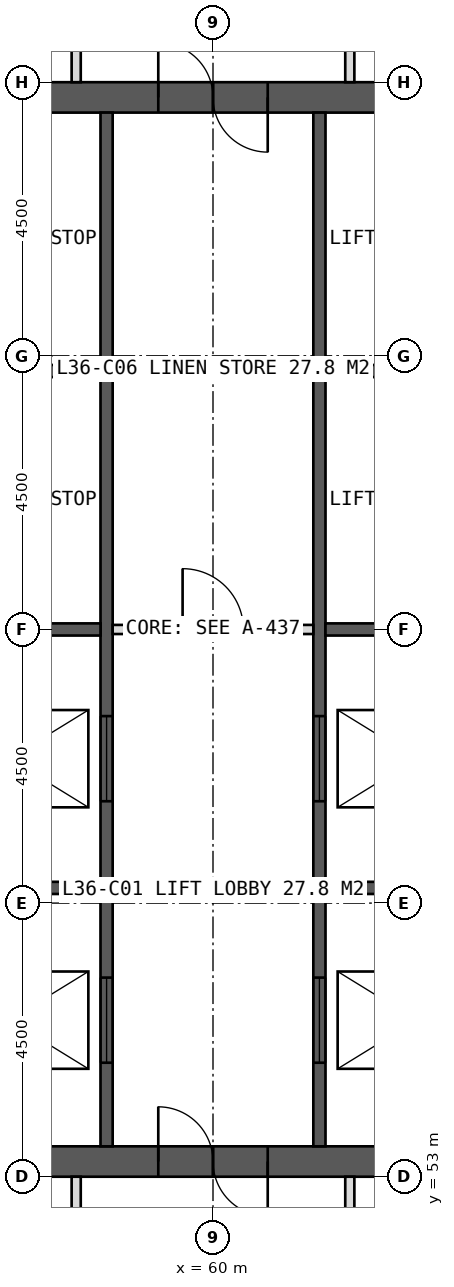
"""IFC4 building model, lengths in metres.
Left out: names, types, materials, properties, quantities, classifications, styles, units other than length and angle.
Written with IfcOpenShell. Run it as: python <this file> out.ifc"""

import sys

from ifc_helpers import new_model, si_unit, direction, frame, frame_2d, origin, place, context, subcontext, project, spatial, rectangle, extrude, element, fill, save


model = new_model("IFC4")
c1 = context("Model", 3, precision=1e-05, world=origin(), true_north=direction((0.0, 1.0)))
c2 = subcontext(c1, "Body", "Model", "MODEL_VIEW")
j1 = project(units=[si_unit("LENGTHUNIT", "METRE"), si_unit("PLANEANGLEUNIT", "RADIAN")], contexts=[c1])
p1 = place(None, origin())
s1 = spatial("IfcSite", under=j1, at=p1, CompositionType="ELEMENT")
p2 = place(p1, origin())
s2 = spatial("IfcBuilding", under=s1, at=p2, CompositionType="ELEMENT")
p3 = place(p2, frame((0.0, 0.0, 152.0)))
s3 = spatial("IfcBuildingStorey", under=s2, at=p3, CompositionType="ELEMENT", Elevation=152.0)
p4 = place(p3, frame((51.0, 70.75, 0.0), z_axis=(0.0, 0.0, 1.0), x_axis=(1.0, 0.0, 0.0)))
e1 = element("IfcWall", 1, at=p4, inside=s3, PredefinedType="SHEAR", context=c2, shape_type="SweptSolid", body=[
    extrude(rectangle(XDim=18.0, YDim=0.5, at=frame_2d((9.0, 0.0))), origin(), (0.0, 0.0, 1.0), 4.0),
])
p5 = place(p4, frame((8.1, 0.0, 0.0)))
e2 = element("IfcOpeningElement", 2, at=p5, cuts=e1, PredefinedType="OPENING", context=c2, shape_type="SweptSolid", body=[
    extrude(rectangle(XDim=1.8, YDim=2.2, at=frame_2d((0.9, 1.1))), frame((0.0, 0.26, 0.0), z_axis=(0.0, -1.0, 0.0), x_axis=(1.0, 0.0, 0.0)), (0.0, 0.0, 1.0), 0.52),
])
p6 = place(p3, frame((51.0, 53.25, 0.0), z_axis=(0.0, 0.0, 1.0), x_axis=(1.0, 0.0, 0.0)))
e3 = element("IfcWall", 3, at=p6, inside=s3, PredefinedType="SHEAR", context=c2, shape_type="SweptSolid", body=[
    extrude(rectangle(XDim=18.0, YDim=0.5, at=frame_2d((9.0, 0.0))), origin(), (0.0, 0.0, 1.0), 4.0),
])
p7 = place(p6, frame((8.1, 0.0, 0.0)))
e4 = element("IfcOpeningElement", 4, at=p7, cuts=e3, PredefinedType="OPENING", context=c2, shape_type="SweptSolid", body=[
    extrude(rectangle(XDim=1.8, YDim=2.2, at=frame_2d((0.9, 1.1))), frame((0.0, 0.26, 0.0), z_axis=(0.0, -1.0, 0.0), x_axis=(1.0, 0.0, 0.0)), (0.0, 0.0, 1.0), 0.52),
])
p8 = place(p3, frame((58.25, 53.5, 0.0), z_axis=(0.0, 0.0, 1.0), x_axis=(0.0, 1.0, 0.0)))
e5 = element("IfcWall", 5, at=p8, inside=s3, PredefinedType="SHEAR", context=c2, shape_type="SweptSolid", body=[
    extrude(rectangle(XDim=17.0, YDim=0.2, at=frame_2d((8.5, 0.0))), origin(), (0.0, 0.0, 1.0), 4.0),
])
p9 = place(p8, frame((1.375, 0.0, 0.0)))
e6 = element("IfcOpeningElement", 6, at=p9, cuts=e5, PredefinedType="OPENING", context=c2, shape_type="SweptSolid", body=[
    extrude(rectangle(XDim=1.4, YDim=2.2, at=frame_2d((0.7, 1.1))), frame((0.0, 0.11, 0.0), z_axis=(0.0, -1.0, 0.0), x_axis=(1.0, 0.0, 0.0)), (0.0, 0.0, 1.0), 0.22),
])
p10 = place(p8, frame((5.675, 0.0, 0.0)))
e7 = element("IfcOpeningElement", 7, at=p10, cuts=e5, PredefinedType="OPENING", context=c2, shape_type="SweptSolid", body=[
    extrude(rectangle(XDim=1.4, YDim=2.2, at=frame_2d((0.7, 1.1))), frame((0.0, 0.11, 0.0), z_axis=(0.0, -1.0, 0.0), x_axis=(1.0, 0.0, 0.0)), (0.0, 0.0, 1.0), 0.22),
])
p11 = place(p3, frame((61.75, 53.5, 0.0), z_axis=(0.0, 0.0, 1.0), x_axis=(0.0, 1.0, 0.0)))
e8 = element("IfcWall", 8, at=p11, inside=s3, PredefinedType="SHEAR", context=c2, shape_type="SweptSolid", body=[
    extrude(rectangle(XDim=17.0, YDim=0.2, at=frame_2d((8.5, 0.0))), origin(), (0.0, 0.0, 1.0), 4.0),
])
p12 = place(p11, frame((1.375, 0.0, 0.0)))
e9 = element("IfcOpeningElement", 9, at=p12, cuts=e8, PredefinedType="OPENING", context=c2, shape_type="SweptSolid", body=[
    extrude(rectangle(XDim=1.4, YDim=2.2, at=frame_2d((0.7, 1.1))), frame((0.0, 0.11, 0.0), z_axis=(0.0, -1.0, 0.0), x_axis=(1.0, 0.0, 0.0)), (0.0, 0.0, 1.0), 0.22),
])
p13 = place(p11, frame((5.675, 0.0, 0.0)))
e10 = element("IfcOpeningElement", 10, at=p13, cuts=e8, PredefinedType="OPENING", context=c2, shape_type="SweptSolid", body=[
    extrude(rectangle(XDim=1.4, YDim=2.2, at=frame_2d((0.7, 1.1))), frame((0.0, 0.11, 0.0), z_axis=(0.0, -1.0, 0.0), x_axis=(1.0, 0.0, 0.0)), (0.0, 0.0, 1.0), 0.22),
])
for number, where, z_axis, x_axis in (
    (11, (55.1, 57.75, 0.0), (0.0, 0.0, 1.0), (1.0, 0.0, 0.0)),
    (12, (61.85, 57.75, 0.0), (0.0, 0.0, 1.0), (1.0, 0.0, 0.0)),
    (13, (55.1, 62.0, 0.0), (0.0, 0.0, 1.0), (1.0, 0.0, 0.0)),
    (14, (61.85, 62.0, 0.0), (0.0, 0.0, 1.0), (1.0, 0.0, 0.0)),
    (15, (55.1, 66.25, 0.0), (0.0, 0.0, 1.0), (1.0, 0.0, 0.0)),
    (16, (61.85, 66.25, 0.0), (0.0, 0.0, 1.0), (1.0, 0.0, 0.0)),
):
    element("IfcWall", number, at=place(p3, frame(where, z_axis=z_axis, x_axis=x_axis)), inside=s3, PredefinedType="SHEAR", context=c2, shape_type="SweptSolid", body=[
        extrude(rectangle(XDim=3.05, YDim=0.2, at=frame_2d((1.525, 0.0))), origin(), (0.0, 0.0, 1.0), 4.0),
    ])
p14 = place(p3, frame((57.75, 71.0, 0.0), z_axis=(0.0, 0.0, 1.0), x_axis=(0.0, 1.0, 0.0)))
e17 = element("IfcWall", 17, at=p14, inside=s3, PredefinedType="PARTITIONING", context=c2, shape_type="SweptSolid", body=[
    extrude(rectangle(XDim=6.6, YDim=0.15, at=frame_2d((3.3, 0.0))), origin(), (0.0, 0.0, 1.0), 3.75),
])
p15 = place(p14, frame((0.6, 0.0, 0.0)))
e18 = element("IfcOpeningElement", 18, at=p15, cuts=e17, PredefinedType="OPENING", context=c2, shape_type="SweptSolid", body=[
    extrude(rectangle(XDim=0.9, YDim=2.1, at=frame_2d((0.45, 1.05))), frame((0.0, 0.085, 0.0), z_axis=(0.0, -1.0, 0.0), x_axis=(1.0, 0.0, 0.0)), (0.0, 0.0, 1.0), 0.17),
])
p16 = place(p3, frame((62.25, 71.0, 0.0), z_axis=(0.0, 0.0, 1.0), x_axis=(0.0, 1.0, 0.0)))
e19 = element("IfcWall", 19, at=p16, inside=s3, PredefinedType="PARTITIONING", context=c2, shape_type="SweptSolid", body=[
    extrude(rectangle(XDim=6.6, YDim=0.15, at=frame_2d((3.3, 0.0))), origin(), (0.0, 0.0, 1.0), 3.75),
])
p17 = place(p16, frame((0.6, 0.0, 0.0)))
e20 = element("IfcOpeningElement", 20, at=p17, cuts=e19, PredefinedType="OPENING", context=c2, shape_type="SweptSolid", body=[
    extrude(rectangle(XDim=0.9, YDim=2.1, at=frame_2d((0.45, 1.05))), frame((0.0, 0.085, 0.0), z_axis=(0.0, -1.0, 0.0), x_axis=(1.0, 0.0, 0.0)), (0.0, 0.0, 1.0), 0.17),
])
p18 = place(p3, frame((62.25, 53.0, 0.0), z_axis=(0.0, 0.0, 1.0), x_axis=(0.0, -1.0, 0.0)))
e21 = element("IfcWall", 21, at=p18, inside=s3, PredefinedType="PARTITIONING", context=c2, shape_type="SweptSolid", body=[
    extrude(rectangle(XDim=6.6, YDim=0.15, at=frame_2d((3.3, 0.0))), origin(), (0.0, 0.0, 1.0), 3.75),
])
p19 = place(p18, frame((0.6, 0.0, 0.0)))
e22 = element("IfcOpeningElement", 22, at=p19, cuts=e21, PredefinedType="OPENING", context=c2, shape_type="SweptSolid", body=[
    extrude(rectangle(XDim=0.9, YDim=2.1, at=frame_2d((0.45, 1.05))), frame((0.0, 0.085, 0.0), z_axis=(0.0, -1.0, 0.0), x_axis=(1.0, 0.0, 0.0)), (0.0, 0.0, 1.0), 0.17),
])
p20 = place(p3, frame((57.75, 53.0, 0.0), z_axis=(0.0, 0.0, 1.0), x_axis=(0.0, -1.0, 0.0)))
e23 = element("IfcWall", 23, at=p20, inside=s3, PredefinedType="PARTITIONING", context=c2, shape_type="SweptSolid", body=[
    extrude(rectangle(XDim=6.6, YDim=0.15, at=frame_2d((3.3, 0.0))), origin(), (0.0, 0.0, 1.0), 3.75),
])
p21 = place(p3, frame((58.35, 62.0, 0.0), z_axis=(0.0, 0.0, 1.0), x_axis=(1.0, 0.0, 0.0)))
e24 = element("IfcWall", 24, at=p21, inside=s3, PredefinedType="PARTITIONING", context=c2, shape_type="SweptSolid", body=[
    extrude(rectangle(XDim=3.3, YDim=0.15, at=frame_2d((1.65, 0.0))), origin(), (0.0, 0.0, 1.0), 3.75),
])
p22 = place(p21, frame((1.15, 0.0, 0.0)))
e25 = element("IfcOpeningElement", 25, at=p22, cuts=e24, PredefinedType="OPENING", context=c2, shape_type="SweptSolid", body=[
    extrude(rectangle(XDim=1.0, YDim=2.1, at=frame_2d((0.5, 1.05))), frame((0.0, 0.085, 0.0), z_axis=(0.0, -1.0, 0.0), x_axis=(1.0, 0.0, 0.0)), (0.0, 0.0, 1.0), 0.17),
])
p23 = place(p7, origin())
e26 = element("IfcDoor", 26, at=p23, inside=s3, OperationType="DOUBLE_DOOR_SINGLE_SWING", PredefinedType="DOOR", context=c2, shape_type="SweptSolid", body=[
    extrude(rectangle(XDim=1.8, YDim=2.2, at=frame_2d((0.9, 1.1))), frame((0.0, 0.025, 0.0), z_axis=(0.0, -1.0, 0.0), x_axis=(1.0, 0.0, 0.0)), (0.0, 0.0, 1.0), 0.05),
])
fill(e4, e26)
p24 = place(p9, origin())
e27 = element("IfcDoor", 27, at=p24, inside=s3, OperationType="SLIDING_TO_LEFT", PredefinedType="DOOR", context=c2, shape_type="SweptSolid", body=[
    extrude(rectangle(XDim=1.4, YDim=2.2, at=frame_2d((0.7, 1.1))), frame((0.0, 0.025, 0.0), z_axis=(0.0, -1.0, 0.0), x_axis=(1.0, 0.0, 0.0)), (0.0, 0.0, 1.0), 0.05),
])
fill(e6, e27)
p25 = place(p12, origin())
e28 = element("IfcDoor", 28, at=p25, inside=s3, OperationType="SLIDING_TO_LEFT", PredefinedType="DOOR", context=c2, shape_type="SweptSolid", body=[
    extrude(rectangle(XDim=1.4, YDim=2.2, at=frame_2d((0.7, 1.1))), frame((0.0, 0.025, 0.0), z_axis=(0.0, -1.0, 0.0), x_axis=(1.0, 0.0, 0.0)), (0.0, 0.0, 1.0), 0.05),
])
fill(e9, e28)
p26 = place(p10, origin())
e29 = element("IfcDoor", 29, at=p26, inside=s3, OperationType="SLIDING_TO_LEFT", PredefinedType="DOOR", context=c2, shape_type="SweptSolid", body=[
    extrude(rectangle(XDim=1.4, YDim=2.2, at=frame_2d((0.7, 1.1))), frame((0.0, 0.025, 0.0), z_axis=(0.0, -1.0, 0.0), x_axis=(1.0, 0.0, 0.0)), (0.0, 0.0, 1.0), 0.05),
])
fill(e7, e29)
p27 = place(p13, origin())
e30 = element("IfcDoor", 30, at=p27, inside=s3, OperationType="SLIDING_TO_LEFT", PredefinedType="DOOR", context=c2, shape_type="SweptSolid", body=[
    extrude(rectangle(XDim=1.4, YDim=2.2, at=frame_2d((0.7, 1.1))), frame((0.0, 0.025, 0.0), z_axis=(0.0, -1.0, 0.0), x_axis=(1.0, 0.0, 0.0)), (0.0, 0.0, 1.0), 0.05),
])
fill(e10, e30)
p28 = place(p22, origin())
e31 = element("IfcDoor", 31, at=p28, inside=s3, OperationType="SINGLE_SWING_LEFT", PredefinedType="DOOR", context=c2, shape_type="SweptSolid", body=[
    extrude(rectangle(XDim=1.0, YDim=2.1, at=frame_2d((0.5, 1.05))), frame((0.0, 0.025, 0.0), z_axis=(0.0, -1.0, 0.0), x_axis=(1.0, 0.0, 0.0)), (0.0, 0.0, 1.0), 0.05),
])
fill(e25, e31)
p29 = place(p5, origin())
e32 = element("IfcDoor", 32, at=p29, inside=s3, OperationType="DOUBLE_DOOR_SINGLE_SWING", PredefinedType="DOOR", context=c2, shape_type="SweptSolid", body=[
    extrude(rectangle(XDim=1.8, YDim=2.2, at=frame_2d((0.9, 1.1))), frame((0.0, 0.025, 0.0), z_axis=(0.0, -1.0, 0.0), x_axis=(1.0, 0.0, 0.0)), (0.0, 0.0, 1.0), 0.05),
])
fill(e2, e32)
save(model, sys.argv[1])
